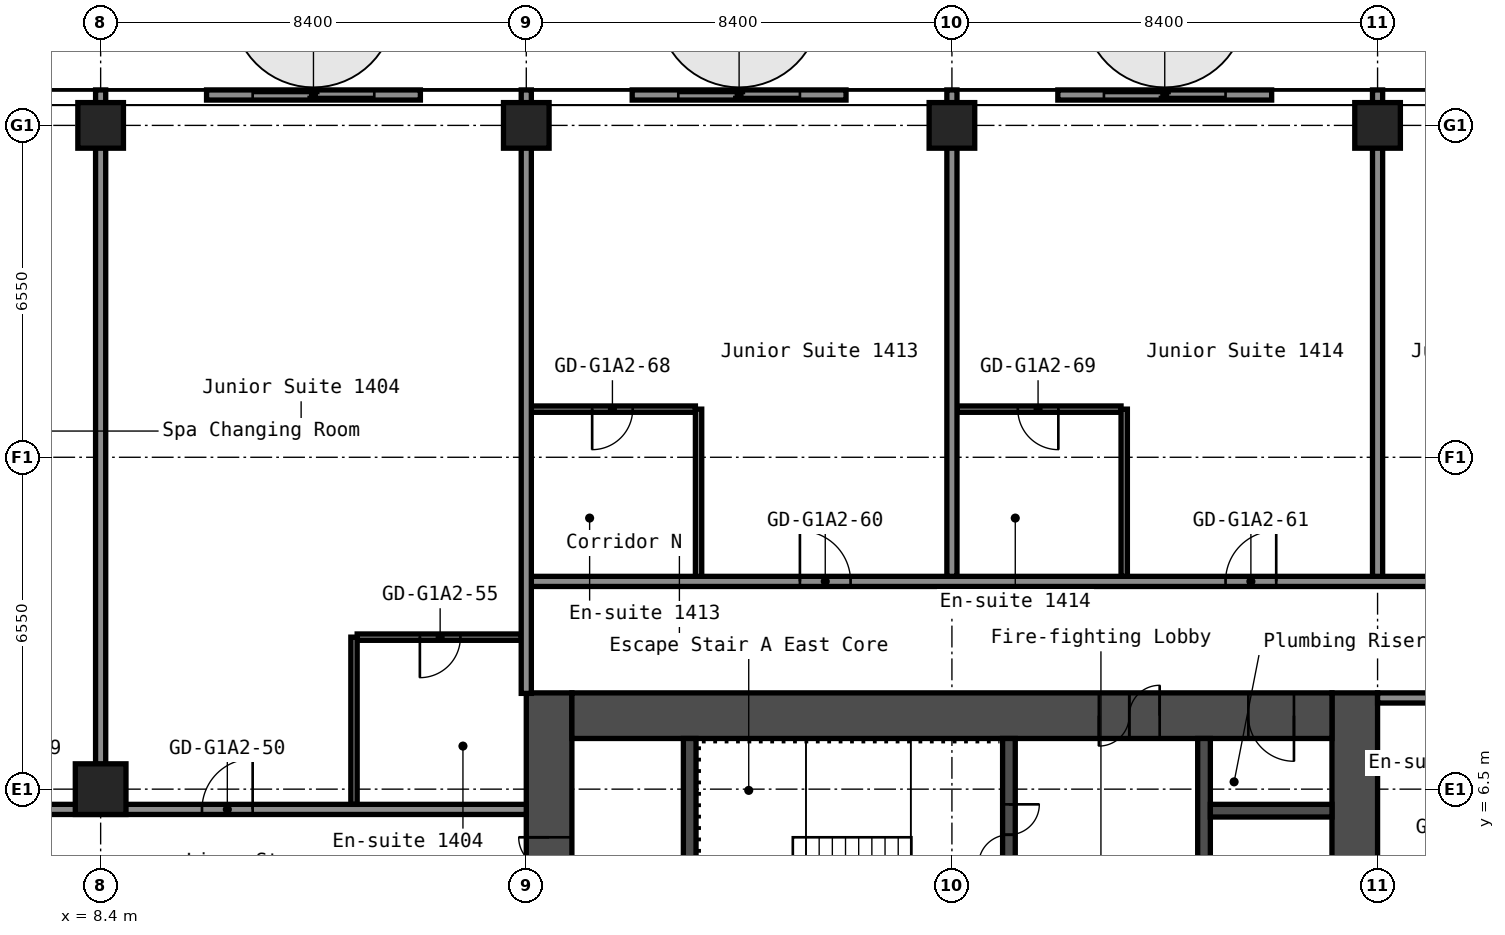
"""IFC4 building model, lengths in metres.
Left out: names, types, materials, properties, quantities, classifications, styles, units other than length and angle.
Written with IfcOpenShell. Run it as: python <this file> out.ifc"""

import sys

from ifc_helpers import new_model, si_unit, direction, frame, frame_2d, origin, origin_2d, place, context, subcontext, project, spatial, rectangle, hollow_rectangle, extrude, element, fill, save


model = new_model("IFC4")
c1 = context("Model", 3, precision=1e-05, world=origin(), true_north=direction((0.0, 1.0)))
c2 = subcontext(c1, "Body", "Model", "MODEL_VIEW")
j1 = project(units=[si_unit("LENGTHUNIT", "METRE"), si_unit("PLANEANGLEUNIT", "RADIAN")], contexts=[c1])
p1 = place(None, origin())
s1 = spatial("IfcSite", under=j1, at=p1, CompositionType="ELEMENT")
p2 = place(p1, origin())
s2 = spatial("IfcBuilding", under=s1, at=p2, CompositionType="ELEMENT")
p3 = place(p2, frame((0.0, 0.0, 51.8)))
s3 = spatial("IfcBuildingStorey", under=s2, at=p3, CompositionType="ELEMENT", Elevation=51.8)
p4 = place(p3, frame((8.4, 6.5, 0.0), z_axis=(0.0, 0.0, 1.0), x_axis=(1.0, 0.0, 0.0)))
e1 = element("IfcColumn", 1, at=p4, inside=s3, PredefinedType="COLUMN", context=c2, shape_type="SweptSolid", body=[
    extrude(hollow_rectangle(XDim=1.0, YDim=1.0, WallThickness=0.04, at=origin_2d()), origin(), (0.0, 0.0, 1.0), 2.8),
])
for number, where, z_axis, x_axis in (
    (2, (8.4, 19.6, 0.0), (0.0, 0.0, 1.0), (1.0, 0.0, 0.0)),
    (3, (16.8, 19.6, 0.0), (0.0, 0.0, 1.0), (1.0, 0.0, 0.0)),
    (4, (25.2, 19.6, 0.0), (0.0, 0.0, 1.0), (1.0, 0.0, 0.0)),
    (5, (33.6, 19.6, 0.0), (0.0, 0.0, 1.0), (1.0, 0.0, 0.0)),
):
    element("IfcColumn", number, at=place(p3, frame(where, z_axis=z_axis, x_axis=x_axis)), inside=s3, PredefinedType="COLUMN", context=c2, shape_type="SweptSolid", body=[
        extrude(hollow_rectangle(XDim=0.9, YDim=0.9, WallThickness=0.036, at=origin_2d()), origin(), (0.0, 0.0, 1.0), 2.8),
    ])
p5 = place(p3, frame((17.25, -8.4, 0.0), z_axis=(0.0, 0.0, 1.0), x_axis=(0.0, 1.0, 0.0)))
e6 = element("IfcWall", 6, at=p5, inside=s3, PredefinedType="SHEAR", context=c2, shape_type="SweptSolid", body=[
    extrude(rectangle(XDim=16.8, YDim=0.9, at=frame_2d((8.4, 0.0))), origin(), (0.0, 0.0, 1.0), 2.8),
])
p6 = place(p5, frame((12.75, 0.0, 0.0)))
e7 = element("IfcOpeningElement", 7, at=p6, cuts=e6, PredefinedType="OPENING", context=c2, shape_type="SweptSolid", body=[
    extrude(rectangle(XDim=1.2, YDim=2.1, at=frame_2d((0.6, 1.05))), frame((0.0, 0.46, 0.0), z_axis=(0.0, -1.0, 0.0), x_axis=(1.0, 0.0, 0.0)), (0.0, 0.0, 1.0), 0.92),
])
p7 = place(p5, frame((2.85, 0.0, 0.0)))
e8 = element("IfcOpeningElement", 8, at=p7, cuts=e6, PredefinedType="OPENING", context=c2, shape_type="SweptSolid", body=[
    extrude(rectangle(XDim=1.2, YDim=2.1, at=frame_2d((0.6, 1.05))), frame((0.0, 0.46, 0.0), z_axis=(0.0, -1.0, 0.0), x_axis=(1.0, 0.0, 0.0)), (0.0, 0.0, 1.0), 0.92),
])
p8 = place(p3, frame((33.15, -8.4, 0.0), z_axis=(0.0, 0.0, 1.0), x_axis=(0.0, 1.0, 0.0)))
e9 = element("IfcWall", 9, at=p8, inside=s3, PredefinedType="SHEAR", context=c2, shape_type="SweptSolid", body=[
    extrude(rectangle(XDim=16.8, YDim=0.9, at=frame_2d((8.4, 0.0))), origin(), (0.0, 0.0, 1.0), 2.8),
])
p9 = place(p3, frame((17.7, 7.95, 0.0), z_axis=(0.0, 0.0, 1.0), x_axis=(1.0, 0.0, 0.0)))
e10 = element("IfcWall", 10, at=p9, inside=s3, PredefinedType="SHEAR", context=c2, shape_type="SweptSolid", body=[
    extrude(rectangle(XDim=15.0, YDim=0.9, at=frame_2d((7.5, 0.0))), origin(), (0.0, 0.0, 1.0), 2.8),
])
p10 = place(p9, frame((10.4, 0.0, 0.0)))
e11 = element("IfcOpeningElement", 11, at=p10, cuts=e10, PredefinedType="OPENING", context=c2, shape_type="SweptSolid", body=[
    extrude(rectangle(XDim=1.2, YDim=2.1, at=frame_2d((0.6, 1.05))), frame((0.0, 0.46, 0.0), z_axis=(0.0, -1.0, 0.0), x_axis=(1.0, 0.0, 0.0)), (0.0, 0.0, 1.0), 0.92),
])
p11 = place(p9, frame((13.35, 0.0, 0.0)))
e12 = element("IfcOpeningElement", 12, at=p11, cuts=e10, PredefinedType="OPENING", context=c2, shape_type="SweptSolid", body=[
    extrude(rectangle(XDim=0.9, YDim=2.1, at=frame_2d((0.45, 1.05))), frame((0.0, 0.46, 0.0), z_axis=(0.0, -1.0, 0.0), x_axis=(1.0, 0.0, 0.0)), (0.0, 0.0, 1.0), 0.92),
])
p12 = place(p3, frame((20.025, 1.2, 0.0), z_axis=(0.0, 0.0, 1.0), x_axis=(0.0, 1.0, 0.0)))
e13 = element("IfcWall", 13, at=p12, inside=s3, PredefinedType="SHEAR", context=c2, shape_type="SweptSolid", body=[
    extrude(rectangle(XDim=6.3, YDim=0.25, at=frame_2d((3.15, 0.0))), origin(), (0.0, 0.0, 1.0), 2.8),
])
p13 = place(p3, frame((26.325, 3.75, 0.0), z_axis=(0.0, 0.0, 1.0), x_axis=(0.0, 1.0, 0.0)))
e14 = element("IfcWall", 14, at=p13, inside=s3, PredefinedType="SHEAR", context=c2, shape_type="SweptSolid", body=[
    extrude(rectangle(XDim=3.75, YDim=0.25, at=frame_2d((1.875, 0.0))), origin(), (0.0, 0.0, 1.0), 2.8),
])
p14 = place(p13, frame((1.25, 0.0, 0.0)))
e15 = element("IfcOpeningElement", 15, at=p14, cuts=e14, PredefinedType="OPENING", context=c2, shape_type="SweptSolid", body=[
    extrude(rectangle(XDim=1.2, YDim=2.1, at=frame_2d((0.6, 1.05))), frame((0.0, 0.135, 0.0), z_axis=(0.0, -1.0, 0.0), x_axis=(1.0, 0.0, 0.0)), (0.0, 0.0, 1.0), 0.27),
])
p15 = place(p3, frame((30.175, 1.45, 0.0), z_axis=(0.0, 0.0, 1.0), x_axis=(0.0, 1.0, 0.0)))
e16 = element("IfcWall", 16, at=p15, inside=s3, PredefinedType="SHEAR", context=c2, shape_type="SweptSolid", body=[
    extrude(rectangle(XDim=6.05, YDim=0.25, at=frame_2d((3.025, 0.0))), origin(), (0.0, 0.0, 1.0), 2.8),
])
p16 = place(p15, frame((2.625, 0.0, 0.0)))
e17 = element("IfcOpeningElement", 17, at=p16, cuts=e16, PredefinedType="OPENING", context=c2, shape_type="SweptSolid", body=[
    extrude(rectangle(XDim=1.1, YDim=2.1, at=frame_2d((0.55, 1.05))), frame((0.0, 0.135, 0.0), z_axis=(0.0, -1.0, 0.0), x_axis=(1.0, 0.0, 0.0)), (0.0, 0.0, 1.0), 0.27),
])
p17 = place(p3, frame((30.3, 6.075, 0.0), z_axis=(0.0, 0.0, 1.0), x_axis=(1.0, 0.0, 0.0)))
e18 = element("IfcWall", 18, at=p17, inside=s3, PredefinedType="SHEAR", context=c2, shape_type="SweptSolid", body=[
    extrude(rectangle(XDim=2.4, YDim=0.25, at=frame_2d((1.2, 0.0))), origin(), (0.0, 0.0, 1.0), 2.8),
])
p18 = place(p3, frame((-16.8, 6.1, 0.0), z_axis=(0.0, 0.0, 1.0), x_axis=(1.0, 0.0, 0.0)))
e19 = element("IfcWall", 19, at=p18, inside=s3, PredefinedType="PARTITIONING", context=c2, shape_type="SweptSolid", body=[
    extrude(rectangle(XDim=33.6, YDim=0.2, at=frame_2d((16.8, 0.0))), origin(), (0.0, 0.0, 1.0), 2.8),
])
p19 = place(p18, frame((5.4, 0.0, 0.0)))
e20 = element("IfcOpeningElement", 20, at=p19, cuts=e19, PredefinedType="OPENING", context=c2, shape_type="SweptSolid", body=[
    extrude(rectangle(XDim=1.0, YDim=2.1, at=frame_2d((0.5, 1.05))), frame((0.0, 0.11, 0.0), z_axis=(0.0, -1.0, 0.0), x_axis=(1.0, 0.0, 0.0)), (0.0, 0.0, 1.0), 0.22),
])
p20 = place(p18, frame((10.3, 0.0, 0.0)))
e21 = element("IfcOpeningElement", 21, at=p20, cuts=e19, PredefinedType="OPENING", context=c2, shape_type="SweptSolid", body=[
    extrude(rectangle(XDim=0.9, YDim=2.1, at=frame_2d((0.45, 1.05))), frame((0.0, 0.11, 0.0), z_axis=(0.0, -1.0, 0.0), x_axis=(1.0, 0.0, 0.0)), (0.0, 0.0, 1.0), 0.22),
])
p21 = place(p18, frame((14.5, 0.0, 0.0)))
e22 = element("IfcOpeningElement", 22, at=p21, cuts=e19, PredefinedType="OPENING", context=c2, shape_type="SweptSolid", body=[
    extrude(rectangle(XDim=0.9, YDim=2.1, at=frame_2d((0.45, 1.05))), frame((0.0, 0.11, 0.0), z_axis=(0.0, -1.0, 0.0), x_axis=(1.0, 0.0, 0.0)), (0.0, 0.0, 1.0), 0.22),
])
p22 = place(p18, frame((18.62, 0.0, 0.0)))
e23 = element("IfcOpeningElement", 23, at=p22, cuts=e19, PredefinedType="OPENING", context=c2, shape_type="SweptSolid", body=[
    extrude(rectangle(XDim=0.9, YDim=2.1, at=frame_2d((0.45, 1.05))), frame((0.0, 0.11, 0.0), z_axis=(0.0, -1.0, 0.0), x_axis=(1.0, 0.0, 0.0)), (0.0, 0.0, 1.0), 0.22),
])
p23 = place(p18, frame((22.82, 0.0, 0.0)))
e24 = element("IfcOpeningElement", 24, at=p23, cuts=e19, PredefinedType="OPENING", context=c2, shape_type="SweptSolid", body=[
    extrude(rectangle(XDim=0.9, YDim=2.1, at=frame_2d((0.45, 1.05))), frame((0.0, 0.11, 0.0), z_axis=(0.0, -1.0, 0.0), x_axis=(1.0, 0.0, 0.0)), (0.0, 0.0, 1.0), 0.22),
])
p24 = place(p18, frame((27.2, 0.0, 0.0)))
e25 = element("IfcOpeningElement", 25, at=p24, cuts=e19, PredefinedType="OPENING", context=c2, shape_type="SweptSolid", body=[
    extrude(rectangle(XDim=1.0, YDim=2.1, at=frame_2d((0.5, 1.05))), frame((0.0, 0.11, 0.0), z_axis=(0.0, -1.0, 0.0), x_axis=(1.0, 0.0, 0.0)), (0.0, 0.0, 1.0), 0.22),
])
p25 = place(p3, frame((33.6, 8.3, 0.0), z_axis=(0.0, 0.0, 1.0), x_axis=(1.0, 0.0, 0.0)))
e26 = element("IfcWall", 26, at=p25, inside=s3, PredefinedType="PARTITIONING", context=c2, shape_type="SweptSolid", body=[
    extrude(rectangle(XDim=15.0, YDim=0.2, at=frame_2d((7.5, 0.0))), origin(), (0.0, 0.0, 1.0), 2.8),
])
p26 = place(p25, frame((9.55, 0.0, 0.0)))
e27 = element("IfcOpeningElement", 27, at=p26, cuts=e26, PredefinedType="OPENING", context=c2, shape_type="SweptSolid", body=[
    extrude(rectangle(XDim=1.6, YDim=2.1, at=frame_2d((0.8, 1.05))), frame((0.0, 0.11, 0.0), z_axis=(0.0, -1.0, 0.0), x_axis=(1.0, 0.0, 0.0)), (0.0, 0.0, 1.0), 0.22),
])
p27 = place(p3, frame((13.462, 9.5, 0.0), z_axis=(0.0, 0.0, 1.0), x_axis=(1.0, 0.0, 0.0)))
e28 = element("IfcWall", 28, at=p27, inside=s3, PredefinedType="PARTITIONING", context=c2, shape_type="SweptSolid", body=[
    extrude(rectangle(XDim=3.238, YDim=0.125, at=frame_2d((1.619, 0.0))), origin(), (0.0, 0.0, 1.0), 2.8),
])
p28 = place(p27, frame((1.238, 0.0, 0.0)))
e29 = element("IfcOpeningElement", 29, at=p28, cuts=e28, PredefinedType="OPENING", context=c2, shape_type="SweptSolid", body=[
    extrude(rectangle(XDim=0.8, YDim=2.1, at=frame_2d((0.4, 1.05))), frame((0.0, 0.073, 0.0), z_axis=(0.0, -1.0, 0.0), x_axis=(1.0, 0.0, 0.0)), (0.0, 0.0, 1.0), 0.145),
])
p29 = place(p3, frame((16.8, 10.6, 0.0), z_axis=(0.0, 0.0, 1.0), x_axis=(1.0, 0.0, 0.0)))
e30 = element("IfcWall", 30, at=p29, inside=s3, PredefinedType="PARTITIONING", context=c2, shape_type="SweptSolid", body=[
    extrude(rectangle(XDim=34.3, YDim=0.2, at=frame_2d((17.15, 0.0))), origin(), (0.0, 0.0, 1.0), 2.8),
])
p30 = place(p29, frame((5.4, 0.0, 0.0)))
e31 = element("IfcOpeningElement", 31, at=p30, cuts=e30, PredefinedType="OPENING", context=c2, shape_type="SweptSolid", body=[
    extrude(rectangle(XDim=1.0, YDim=2.1, at=frame_2d((0.5, 1.05))), frame((0.0, 0.11, 0.0), z_axis=(0.0, -1.0, 0.0), x_axis=(1.0, 0.0, 0.0)), (0.0, 0.0, 1.0), 0.22),
])
p31 = place(p29, frame((13.8, 0.0, 0.0)))
e32 = element("IfcOpeningElement", 32, at=p31, cuts=e30, PredefinedType="OPENING", context=c2, shape_type="SweptSolid", body=[
    extrude(rectangle(XDim=1.0, YDim=2.1, at=frame_2d((0.5, 1.05))), frame((0.0, 0.11, 0.0), z_axis=(0.0, -1.0, 0.0), x_axis=(1.0, 0.0, 0.0)), (0.0, 0.0, 1.0), 0.22),
])
p32 = place(p29, frame((18.8, 0.0, 0.0)))
e33 = element("IfcOpeningElement", 33, at=p32, cuts=e30, PredefinedType="OPENING", context=c2, shape_type="SweptSolid", body=[
    extrude(rectangle(XDim=1.0, YDim=2.1, at=frame_2d((0.5, 1.05))), frame((0.0, 0.11, 0.0), z_axis=(0.0, -1.0, 0.0), x_axis=(1.0, 0.0, 0.0)), (0.0, 0.0, 1.0), 0.22),
])
p33 = place(p29, frame((30.8, 0.0, 0.0)))
e34 = element("IfcOpeningElement", 34, at=p33, cuts=e30, PredefinedType="OPENING", context=c2, shape_type="SweptSolid", body=[
    extrude(rectangle(XDim=1.0, YDim=2.1, at=frame_2d((0.5, 1.05))), frame((0.0, 0.11, 0.0), z_axis=(0.0, -1.0, 0.0), x_axis=(1.0, 0.0, 0.0)), (0.0, 0.0, 1.0), 0.22),
])
p34 = place(p3, frame((16.9, 14.0, 0.0), z_axis=(0.0, 0.0, 1.0), x_axis=(1.0, 0.0, 0.0)))
e35 = element("IfcWall", 35, at=p34, inside=s3, PredefinedType="PARTITIONING", context=c2, shape_type="SweptSolid", body=[
    extrude(rectangle(XDim=3.238, YDim=0.125, at=frame_2d((1.619, 0.0))), origin(), (0.0, 0.0, 1.0), 2.8),
])
p35 = place(p34, frame((1.2, 0.0, 0.0)))
e36 = element("IfcOpeningElement", 36, at=p35, cuts=e35, PredefinedType="OPENING", context=c2, shape_type="SweptSolid", body=[
    extrude(rectangle(XDim=0.8, YDim=2.1, at=frame_2d((0.4, 1.05))), frame((0.0, 0.073, 0.0), z_axis=(0.0, -1.0, 0.0), x_axis=(1.0, 0.0, 0.0)), (0.0, 0.0, 1.0), 0.145),
])
p36 = place(p3, frame((25.3, 14.0, 0.0), z_axis=(0.0, 0.0, 1.0), x_axis=(1.0, 0.0, 0.0)))
e37 = element("IfcWall", 37, at=p36, inside=s3, PredefinedType="PARTITIONING", context=c2, shape_type="SweptSolid", body=[
    extrude(rectangle(XDim=3.238, YDim=0.125, at=frame_2d((1.619, 0.0))), origin(), (0.0, 0.0, 1.0), 2.8),
])
p37 = place(p36, frame((1.2, 0.0, 0.0)))
e38 = element("IfcOpeningElement", 38, at=p37, cuts=e37, PredefinedType="OPENING", context=c2, shape_type="SweptSolid", body=[
    extrude(rectangle(XDim=0.8, YDim=2.1, at=frame_2d((0.4, 1.05))), frame((0.0, 0.073, 0.0), z_axis=(0.0, -1.0, 0.0), x_axis=(1.0, 0.0, 0.0)), (0.0, 0.0, 1.0), 0.145),
])
p38 = place(p3, frame((8.4, 6.99, 0.0), z_axis=(0.0, 0.0, 1.0), x_axis=(0.0, 1.0, 0.0)))
e39 = element("IfcWall", 39, at=p38, inside=s3, PredefinedType="PARTITIONING", context=c2, shape_type="SweptSolid", body=[
    extrude(rectangle(XDim=13.31, YDim=0.2, at=frame_2d((6.655, 0.0))), origin(), (0.0, 0.0, 1.0), 2.8),
])
p39 = place(p3, frame((13.4, 6.2, 0.0), z_axis=(0.0, 0.0, 1.0), x_axis=(0.0, 1.0, 0.0)))
e40 = element("IfcWall", 40, at=p39, inside=s3, PredefinedType="PARTITIONING", context=c2, shape_type="SweptSolid", body=[
    extrude(rectangle(XDim=3.3, YDim=0.125, at=frame_2d((1.65, 0.0))), origin(), (0.0, 0.0, 1.0), 2.8),
])
p40 = place(p3, frame((16.8, 8.39, 0.0), z_axis=(0.0, 0.0, 1.0), x_axis=(0.0, 1.0, 0.0)))
e41 = element("IfcWall", 41, at=p40, inside=s3, PredefinedType="PARTITIONING", context=c2, shape_type="SweptSolid", body=[
    extrude(rectangle(XDim=11.91, YDim=0.2, at=frame_2d((5.955, 0.0))), origin(), (0.0, 0.0, 1.0), 2.8),
])
p41 = place(p3, frame((20.2, 10.7, 0.0), z_axis=(0.0, 0.0, 1.0), x_axis=(0.0, 1.0, 0.0)))
e42 = element("IfcWall", 42, at=p41, inside=s3, PredefinedType="PARTITIONING", context=c2, shape_type="SweptSolid", body=[
    extrude(rectangle(XDim=3.3, YDim=0.125, at=frame_2d((1.65, 0.0))), origin(), (0.0, 0.0, 1.0), 2.8),
])
p42 = place(p3, frame((25.2, 10.7, 0.0), z_axis=(0.0, 0.0, 1.0), x_axis=(0.0, 1.0, 0.0)))
e43 = element("IfcWall", 43, at=p42, inside=s3, PredefinedType="PARTITIONING", context=c2, shape_type="SweptSolid", body=[
    extrude(rectangle(XDim=9.6, YDim=0.2, at=frame_2d((4.8, 0.0))), origin(), (0.0, 0.0, 1.0), 2.8),
])
p43 = place(p3, frame((28.6, 10.7, 0.0), z_axis=(0.0, 0.0, 1.0), x_axis=(0.0, 1.0, 0.0)))
e44 = element("IfcWall", 44, at=p43, inside=s3, PredefinedType="PARTITIONING", context=c2, shape_type="SweptSolid", body=[
    extrude(rectangle(XDim=3.3, YDim=0.125, at=frame_2d((1.65, 0.0))), origin(), (0.0, 0.0, 1.0), 2.8),
])
p44 = place(p3, frame((33.6, 10.7, 0.0), z_axis=(0.0, 0.0, 1.0), x_axis=(0.0, 1.0, 0.0)))
e45 = element("IfcWall", 45, at=p44, inside=s3, PredefinedType="PARTITIONING", context=c2, shape_type="SweptSolid", body=[
    extrude(rectangle(XDim=9.6, YDim=0.2, at=frame_2d((4.8, 0.0))), origin(), (0.0, 0.0, 1.0), 2.8),
])
p45 = place(p3, frame((31.51, 20.2, 0.0), z_axis=(0.0, 0.0, 1.0), x_axis=(-1.0, 0.0, 0.0)))
p46 = place(p45, frame((0.91, 0.0, 0.0)))
p47 = place(p46, frame((2.4, 0.0, 0.0), z_axis=(0.0, 0.0, 1.0), x_axis=(-1.0, 0.0, 0.0)))
e46 = element("IfcDoor", 46, at=p47, inside=s3, OperationType="SLIDING_TO_LEFT", PredefinedType="DOOR", context=c2, shape_type="SweptSolid", body=[
    extrude(rectangle(XDim=2.4, YDim=2.2, at=frame_2d((1.2, 1.1))), frame((0.0, 0.025, 0.0), z_axis=(0.0, -1.0, 0.0), x_axis=(1.0, 0.0, 0.0)), (0.0, 0.0, 1.0), 0.05),
])
p48 = place(p3, frame((23.11, 20.2, 0.0), z_axis=(0.0, 0.0, 1.0), x_axis=(-1.0, 0.0, 0.0)))
p49 = place(p48, frame((0.91, 0.0, 0.0)))
p50 = place(p49, frame((2.4, 0.0, 0.0), z_axis=(0.0, 0.0, 1.0), x_axis=(-1.0, 0.0, 0.0)))
e47 = element("IfcDoor", 47, at=p50, inside=s3, OperationType="SLIDING_TO_LEFT", PredefinedType="DOOR", context=c2, shape_type="SweptSolid", body=[
    extrude(rectangle(XDim=2.4, YDim=2.2, at=frame_2d((1.2, 1.1))), frame((0.0, 0.025, 0.0), z_axis=(0.0, -1.0, 0.0), x_axis=(1.0, 0.0, 0.0)), (0.0, 0.0, 1.0), 0.05),
])
p51 = place(p3, frame((14.71, 20.2, 0.0), z_axis=(0.0, 0.0, 1.0), x_axis=(-1.0, 0.0, 0.0)))
p52 = place(p51, frame((0.91, 0.0, 0.0)))
p53 = place(p52, frame((2.4, 0.0, 0.0), z_axis=(0.0, 0.0, 1.0), x_axis=(-1.0, 0.0, 0.0)))
e48 = element("IfcDoor", 48, at=p53, inside=s3, OperationType="SLIDING_TO_LEFT", PredefinedType="DOOR", context=c2, shape_type="SweptSolid", body=[
    extrude(rectangle(XDim=2.4, YDim=2.2, at=frame_2d((1.2, 1.1))), frame((0.0, 0.025, 0.0), z_axis=(0.0, -1.0, 0.0), x_axis=(1.0, 0.0, 0.0)), (0.0, 0.0, 1.0), 0.05),
])
p54 = place(p6, origin())
e49 = element("IfcDoor", 49, at=p54, inside=s3, OperationType="DOUBLE_DOOR_SINGLE_SWING", PredefinedType="DOOR", context=c2, shape_type="SweptSolid", body=[
    extrude(rectangle(XDim=1.2, YDim=2.1, at=frame_2d((0.6, 1.05))), frame((0.0, 0.025, 0.0), z_axis=(0.0, -1.0, 0.0), x_axis=(1.0, 0.0, 0.0)), (0.0, 0.0, 1.0), 0.05),
])
fill(e7, e49)
p55 = place(p10, origin())
e50 = element("IfcDoor", 50, at=p55, inside=s3, OperationType="DOUBLE_DOOR_SINGLE_SWING", PredefinedType="DOOR", context=c2, shape_type="SweptSolid", body=[
    extrude(rectangle(XDim=1.2, YDim=2.1, at=frame_2d((0.6, 1.05))), frame((0.0, 0.025, 0.0), z_axis=(0.0, -1.0, 0.0), x_axis=(1.0, 0.0, 0.0)), (0.0, 0.0, 1.0), 0.05),
])
fill(e11, e50)
p56 = place(p11, origin())
e51 = element("IfcDoor", 51, at=p56, inside=s3, OperationType="SINGLE_SWING_RIGHT", PredefinedType="DOOR", context=c2, shape_type="SweptSolid", body=[
    extrude(rectangle(XDim=0.9, YDim=2.1, at=frame_2d((0.45, 1.05))), frame((0.0, 0.025, 0.0), z_axis=(0.0, -1.0, 0.0), x_axis=(1.0, 0.0, 0.0)), (0.0, 0.0, 1.0), 0.05),
])
fill(e12, e51)
p57 = place(p14, origin())
e52 = element("IfcDoor", 52, at=p57, inside=s3, OperationType="DOUBLE_DOOR_SINGLE_SWING", PredefinedType="DOOR", context=c2, shape_type="SweptSolid", body=[
    extrude(rectangle(XDim=1.2, YDim=2.1, at=frame_2d((0.6, 1.05))), frame((0.0, 0.025, 0.0), z_axis=(0.0, -1.0, 0.0), x_axis=(1.0, 0.0, 0.0)), (0.0, 0.0, 1.0), 0.05),
])
fill(e15, e52)
p58 = place(p24, origin())
e53 = element("IfcDoor", 53, at=p58, inside=s3, OperationType="SINGLE_SWING_LEFT", PredefinedType="DOOR", context=c2, shape_type="SweptSolid", body=[
    extrude(rectangle(XDim=1.0, YDim=2.1, at=frame_2d((0.5, 1.05))), frame((0.0, 0.025, 0.0), z_axis=(0.0, -1.0, 0.0), x_axis=(1.0, 0.0, 0.0)), (0.0, 0.0, 1.0), 0.05),
])
fill(e25, e53)
p59 = place(p28, origin())
e54 = element("IfcDoor", 54, at=p59, inside=s3, OperationType="SINGLE_SWING_LEFT", PredefinedType="DOOR", context=c2, shape_type="SweptSolid", body=[
    extrude(rectangle(XDim=0.8, YDim=2.1, at=frame_2d((0.4, 1.05))), frame((0.0, 0.025, 0.0), z_axis=(0.0, -1.0, 0.0), x_axis=(1.0, 0.0, 0.0)), (0.0, 0.0, 1.0), 0.05),
])
fill(e29, e54)
p60 = place(p30, origin())
e55 = element("IfcDoor", 55, at=p60, inside=s3, OperationType="SINGLE_SWING_RIGHT", PredefinedType="DOOR", context=c2, shape_type="SweptSolid", body=[
    extrude(rectangle(XDim=1.0, YDim=2.1, at=frame_2d((0.5, 1.05))), frame((0.0, 0.025, 0.0), z_axis=(0.0, -1.0, 0.0), x_axis=(1.0, 0.0, 0.0)), (0.0, 0.0, 1.0), 0.05),
])
fill(e31, e55)
p61 = place(p31, origin())
e56 = element("IfcDoor", 56, at=p61, inside=s3, OperationType="SINGLE_SWING_LEFT", PredefinedType="DOOR", context=c2, shape_type="SweptSolid", body=[
    extrude(rectangle(XDim=1.0, YDim=2.1, at=frame_2d((0.5, 1.05))), frame((0.0, 0.025, 0.0), z_axis=(0.0, -1.0, 0.0), x_axis=(1.0, 0.0, 0.0)), (0.0, 0.0, 1.0), 0.05),
])
fill(e32, e56)
p62 = place(p35, origin())
e57 = element("IfcDoor", 57, at=p62, inside=s3, OperationType="SINGLE_SWING_LEFT", PredefinedType="DOOR", context=c2, shape_type="SweptSolid", body=[
    extrude(rectangle(XDim=0.8, YDim=2.1, at=frame_2d((0.4, 1.05))), frame((0.0, 0.025, 0.0), z_axis=(0.0, -1.0, 0.0), x_axis=(1.0, 0.0, 0.0)), (0.0, 0.0, 1.0), 0.05),
])
fill(e36, e57)
p63 = place(p37, origin())
e58 = element("IfcDoor", 58, at=p63, inside=s3, OperationType="SINGLE_SWING_RIGHT", PredefinedType="DOOR", context=c2, shape_type="SweptSolid", body=[
    extrude(rectangle(XDim=0.8, YDim=2.1, at=frame_2d((0.4, 1.05))), frame((0.0, 0.025, 0.0), z_axis=(0.0, -1.0, 0.0), x_axis=(1.0, 0.0, 0.0)), (0.0, 0.0, 1.0), 0.05),
])
fill(e38, e58)
save(model, sys.argv[1])
